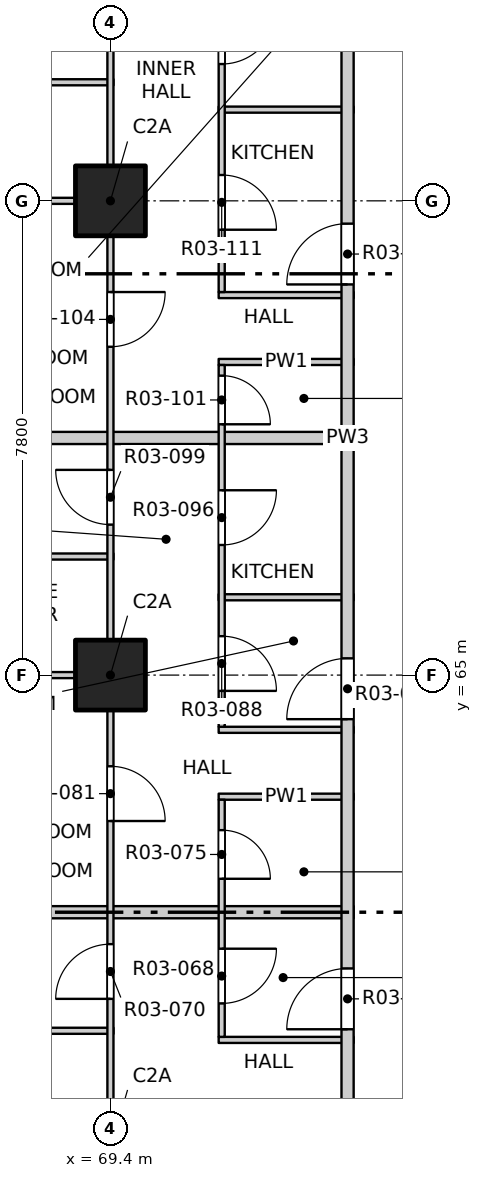
"""IFC4 building model, lengths in metres.
Left out: names, types, materials, properties, quantities, classifications, styles, units other than length and angle.
Written with IfcOpenShell. Run it as: python <this file> out.ifc"""

import sys

from ifc_helpers import new_model, si_unit, direction, frame, frame_2d, origin, origin_2d, place, context, subcontext, project, spatial, rectangle, extrude, element, fill, save


model = new_model("IFC4")
c1 = context("Model", 3, precision=1e-05, world=origin(), true_north=direction((0.0, 1.0)))
c2 = subcontext(c1, "Body", "Model", "MODEL_VIEW")
j1 = project(units=[si_unit("LENGTHUNIT", "METRE"), si_unit("PLANEANGLEUNIT", "RADIAN")], contexts=[c1])
p1 = place(None, origin())
s1 = spatial("IfcSite", under=j1, at=p1, CompositionType="ELEMENT")
p2 = place(p1, origin())
s2 = spatial("IfcBuilding", under=s1, at=p2, CompositionType="ELEMENT")
p3 = place(p2, frame((0.0, 0.0, 39.9)))
s3 = spatial("IfcBuildingStorey", under=s2, at=p3, CompositionType="ELEMENT", Elevation=39.9)
for number, where, z_axis, x_axis in (
    (1, (69.4, 65.0, -0.25), (0.0, 0.0, 1.0), (1.0, 0.0, 0.0)),
    (2, (69.4, 72.8, -0.25), (0.0, 0.0, 1.0), (1.0, 0.0, 0.0)),
):
    element("IfcColumn", number, at=place(p3, frame(where, z_axis=z_axis, x_axis=x_axis)), inside=s3, PredefinedType="COLUMN", context=c2, shape_type="SweptSolid", body=[
        extrude(rectangle(XDim=1.15, YDim=1.15, at=origin_2d()), origin(), (0.0, 0.0, 1.0), 3.4),
    ])
p4 = place(p3, frame((71.18, 59.0, 0.0), z_axis=(0.0, 0.0, 1.0), x_axis=(1.0, 0.0, 0.0)))
e3 = element("IfcWall", 3, at=p4, inside=s3, PredefinedType="PARTITIONING", context=c2, shape_type="SweptSolid", body=[
    extrude(rectangle(XDim=2.22, YDim=0.1, at=frame_2d((1.11, 0.0))), origin(), (0.0, 0.0, 1.0), 3.15),
])
p5 = place(p3, frame((65.75, 59.15, 0.0), z_axis=(0.0, 0.0, 1.0), x_axis=(1.0, 0.0, 0.0)))
e4 = element("IfcWall", 4, at=p5, inside=s3, PredefinedType="PARTITIONING", context=c2, shape_type="SweptSolid", body=[
    extrude(rectangle(XDim=3.7, YDim=0.1, at=frame_2d((1.85, 0.0))), origin(), (0.0, 0.0, 1.0), 3.15),
])
p6 = place(p3, frame((61.9, 61.1, 0.0), z_axis=(0.0, 0.0, 1.0), x_axis=(1.0, 0.0, 0.0)))
e5 = element("IfcWall", 5, at=p6, inside=s3, PredefinedType="PARTITIONING", context=c2, shape_type="SweptSolid", body=[
    extrude(rectangle(XDim=11.5, YDim=0.2, at=frame_2d((5.75, 0.0))), origin(), (0.0, 0.0, 1.0), 3.15),
])
for number, where, z_axis, x_axis in (
    (6, (71.18, 63.0, 0.0), (0.0, 0.0, 1.0), (1.0, 0.0, 0.0)),
    (7, (71.18, 64.1, 0.0), (0.0, 0.0, 1.0), (1.0, 0.0, 0.0)),
):
    element("IfcWall", number, at=place(p3, frame(where, z_axis=z_axis, x_axis=x_axis)), inside=s3, PredefinedType="PARTITIONING", context=c2, shape_type="SweptSolid", body=[
        extrude(rectangle(XDim=2.22, YDim=0.1, at=frame_2d((1.11, 0.0))), origin(), (0.0, 0.0, 1.0), 3.15),
    ])
p7 = place(p3, frame((61.9, 65.0, 0.0), z_axis=(0.0, 0.0, 1.0), x_axis=(1.0, 0.0, 0.0)))
e8 = element("IfcWall", 8, at=p7, inside=s3, PredefinedType="PARTITIONING", context=c2, shape_type="SweptSolid", body=[
    extrude(rectangle(XDim=7.55, YDim=0.1, at=frame_2d((3.775, 0.0))), origin(), (0.0, 0.0, 1.0), 2.55),
])
p8 = place(p3, frame((71.18, 66.28, 0.0), z_axis=(0.0, 0.0, 1.0), x_axis=(1.0, 0.0, 0.0)))
e9 = element("IfcWall", 9, at=p8, inside=s3, PredefinedType="PARTITIONING", context=c2, shape_type="SweptSolid", body=[
    extrude(rectangle(XDim=2.22, YDim=0.1, at=frame_2d((1.11, 0.0))), origin(), (0.0, 0.0, 1.0), 3.15),
])
p9 = place(p3, frame((65.9, 66.95, 0.0), z_axis=(0.0, 0.0, 1.0), x_axis=(1.0, 0.0, 0.0)))
e10 = element("IfcWall", 10, at=p9, inside=s3, PredefinedType="PARTITIONING", context=c2, shape_type="SweptSolid", body=[
    extrude(rectangle(XDim=3.55, YDim=0.1, at=frame_2d((1.775, 0.0))), origin(), (0.0, 0.0, 1.0), 3.15),
])
p10 = place(p3, frame((61.9, 68.9, 0.0), z_axis=(0.0, 0.0, 1.0), x_axis=(1.0, 0.0, 0.0)))
e11 = element("IfcWall", 11, at=p10, inside=s3, PredefinedType="PARTITIONING", context=c2, shape_type="SweptSolid", body=[
    extrude(rectangle(XDim=11.5, YDim=0.2, at=frame_2d((5.75, 0.0))), origin(), (0.0, 0.0, 1.0), 3.15),
])
for number, where, z_axis, x_axis in (
    (12, (71.18, 70.15, 0.0), (0.0, 0.0, 1.0), (1.0, 0.0, 0.0)),
    (13, (71.18, 71.25, 0.0), (0.0, 0.0, 1.0), (1.0, 0.0, 0.0)),
):
    element("IfcWall", number, at=place(p3, frame(where, z_axis=z_axis, x_axis=x_axis)), inside=s3, PredefinedType="PARTITIONING", context=c2, shape_type="SweptSolid", body=[
        extrude(rectangle(XDim=2.22, YDim=0.1, at=frame_2d((1.11, 0.0))), origin(), (0.0, 0.0, 1.0), 3.15),
    ])
p11 = place(p3, frame((61.9, 72.8, 0.0), z_axis=(0.0, 0.0, 1.0), x_axis=(1.0, 0.0, 0.0)))
e14 = element("IfcWall", 14, at=p11, inside=s3, PredefinedType="PARTITIONING", context=c2, shape_type="SweptSolid", body=[
    extrude(rectangle(XDim=7.55, YDim=0.1, at=frame_2d((3.775, 0.0))), origin(), (0.0, 0.0, 1.0), 2.55),
])
p12 = place(p3, frame((71.18, 74.3, 0.0), z_axis=(0.0, 0.0, 1.0), x_axis=(1.0, 0.0, 0.0)))
e15 = element("IfcWall", 15, at=p12, inside=s3, PredefinedType="PARTITIONING", context=c2, shape_type="SweptSolid", body=[
    extrude(rectangle(XDim=2.22, YDim=0.1, at=frame_2d((1.11, 0.0))), origin(), (0.0, 0.0, 1.0), 3.15),
])
p13 = place(p3, frame((65.75, 74.75, 0.0), z_axis=(0.0, 0.0, 1.0), x_axis=(1.0, 0.0, 0.0)))
e16 = element("IfcWall", 16, at=p13, inside=s3, PredefinedType="PARTITIONING", context=c2, shape_type="SweptSolid", body=[
    extrude(rectangle(XDim=3.7, YDim=0.1, at=frame_2d((1.85, 0.0))), origin(), (0.0, 0.0, 1.0), 3.15),
])
p14 = place(p3, frame((69.4, 41.9, 0.0), z_axis=(0.0, 0.0, 1.0), x_axis=(0.0, 1.0, 0.0)))
e17 = element("IfcWall", 17, at=p14, inside=s3, PredefinedType="PARTITIONING", context=c2, shape_type="SweptSolid", body=[
    extrude(rectangle(XDim=46.2, YDim=0.1, at=frame_2d((23.1, 0.0))), origin(), (0.0, 0.0, 1.0), 3.15),
])
p15 = place(p14, frame((1.2, 0.0, 0.0)))
e18 = element("IfcOpeningElement", 18, at=p15, cuts=e17, PredefinedType="OPENING", context=c2, shape_type="SweptSolid", body=[
    extrude(rectangle(XDim=0.9, YDim=2.1, at=frame_2d((0.45, 1.05))), frame((0.0, 0.06, 0.0), z_axis=(0.0, -1.0, 0.0), x_axis=(1.0, 0.0, 0.0)), (0.0, 0.0, 1.0), 0.12),
])
p16 = place(p14, frame((5.9, 0.0, 0.0)))
e19 = element("IfcOpeningElement", 19, at=p16, cuts=e17, PredefinedType="OPENING", context=c2, shape_type="SweptSolid", body=[
    extrude(rectangle(XDim=0.9, YDim=2.1, at=frame_2d((0.45, 1.05))), frame((0.0, 0.06, 0.0), z_axis=(0.0, -1.0, 0.0), x_axis=(1.0, 0.0, 0.0)), (0.0, 0.0, 1.0), 0.12),
])
p17 = place(p14, frame((9.0, 0.0, 0.0)))
e20 = element("IfcOpeningElement", 20, at=p17, cuts=e17, PredefinedType="OPENING", context=c2, shape_type="SweptSolid", body=[
    extrude(rectangle(XDim=0.9, YDim=2.1, at=frame_2d((0.45, 1.05))), frame((0.0, 0.06, 0.0), z_axis=(0.0, -1.0, 0.0), x_axis=(1.0, 0.0, 0.0)), (0.0, 0.0, 1.0), 0.12),
])
p18 = place(p14, frame((13.725, 0.0, 0.0)))
e21 = element("IfcOpeningElement", 21, at=p18, cuts=e17, PredefinedType="OPENING", context=c2, shape_type="SweptSolid", body=[
    extrude(rectangle(XDim=0.9, YDim=2.1, at=frame_2d((0.45, 1.05))), frame((0.0, 0.06, 0.0), z_axis=(0.0, -1.0, 0.0), x_axis=(1.0, 0.0, 0.0)), (0.0, 0.0, 1.0), 0.12),
])
p19 = place(p14, frame((17.775, 0.0, 0.0)))
e22 = element("IfcOpeningElement", 22, at=p19, cuts=e17, PredefinedType="OPENING", context=c2, shape_type="SweptSolid", body=[
    extrude(rectangle(XDim=0.9, YDim=2.1, at=frame_2d((0.45, 1.05))), frame((0.0, 0.06, 0.0), z_axis=(0.0, -1.0, 0.0), x_axis=(1.0, 0.0, 0.0)), (0.0, 0.0, 1.0), 0.12),
])
p20 = place(p14, frame((20.7, 0.0, 0.0)))
e23 = element("IfcOpeningElement", 23, at=p20, cuts=e17, PredefinedType="OPENING", context=c2, shape_type="SweptSolid", body=[
    extrude(rectangle(XDim=0.9, YDim=2.1, at=frame_2d((0.45, 1.05))), frame((0.0, 0.06, 0.0), z_axis=(0.0, -1.0, 0.0), x_axis=(1.0, 0.0, 0.0)), (0.0, 0.0, 1.0), 0.12),
])
p21 = place(p14, frame((25.575, 0.0, 0.0)))
e24 = element("IfcOpeningElement", 24, at=p21, cuts=e17, PredefinedType="OPENING", context=c2, shape_type="SweptSolid", body=[
    extrude(rectangle(XDim=0.9, YDim=2.1, at=frame_2d((0.45, 1.05))), frame((0.0, 0.06, 0.0), z_axis=(0.0, -1.0, 0.0), x_axis=(1.0, 0.0, 0.0)), (0.0, 0.0, 1.0), 0.12),
])
p22 = place(p14, frame((28.5, 0.0, 0.0)))
e25 = element("IfcOpeningElement", 25, at=p22, cuts=e17, PredefinedType="OPENING", context=c2, shape_type="SweptSolid", body=[
    extrude(rectangle(XDim=0.9, YDim=2.1, at=frame_2d((0.45, 1.05))), frame((0.0, 0.06, 0.0), z_axis=(0.0, -1.0, 0.0), x_axis=(1.0, 0.0, 0.0)), (0.0, 0.0, 1.0), 0.12),
])
p23 = place(p14, frame((33.375, 0.0, 0.0)))
e26 = element("IfcOpeningElement", 26, at=p23, cuts=e17, PredefinedType="OPENING", context=c2, shape_type="SweptSolid", body=[
    extrude(rectangle(XDim=0.9, YDim=2.1, at=frame_2d((0.45, 1.05))), frame((0.0, 0.06, 0.0), z_axis=(0.0, -1.0, 0.0), x_axis=(1.0, 0.0, 0.0)), (0.0, 0.0, 1.0), 0.12),
])
p24 = place(p14, frame((36.3, 0.0, 0.0)))
e27 = element("IfcOpeningElement", 27, at=p24, cuts=e17, PredefinedType="OPENING", context=c2, shape_type="SweptSolid", body=[
    extrude(rectangle(XDim=0.9, YDim=2.1, at=frame_2d((0.45, 1.05))), frame((0.0, 0.06, 0.0), z_axis=(0.0, -1.0, 0.0), x_axis=(1.0, 0.0, 0.0)), (0.0, 0.0, 1.0), 0.12),
])
p25 = place(p14, frame((40.2, 0.0, 0.0)))
e28 = element("IfcOpeningElement", 28, at=p25, cuts=e17, PredefinedType="OPENING", context=c2, shape_type="SweptSolid", body=[
    extrude(rectangle(XDim=0.9, YDim=2.1, at=frame_2d((0.45, 1.05))), frame((0.0, 0.06, 0.0), z_axis=(0.0, -1.0, 0.0), x_axis=(1.0, 0.0, 0.0)), (0.0, 0.0, 1.0), 0.12),
])
p26 = place(p14, frame((44.1, 0.0, 0.0)))
e29 = element("IfcOpeningElement", 29, at=p26, cuts=e17, PredefinedType="OPENING", context=c2, shape_type="SweptSolid", body=[
    extrude(rectangle(XDim=0.9, YDim=2.1, at=frame_2d((0.45, 1.05))), frame((0.0, 0.06, 0.0), z_axis=(0.0, -1.0, 0.0), x_axis=(1.0, 0.0, 0.0)), (0.0, 0.0, 1.0), 0.12),
])
p27 = place(p3, frame((71.23, 59.05, 0.0), z_axis=(0.0, 0.0, 1.0), x_axis=(0.0, 1.0, 0.0)))
e30 = element("IfcWall", 30, at=p27, inside=s3, PredefinedType="PARTITIONING", context=c2, shape_type="SweptSolid", body=[
    extrude(rectangle(XDim=3.9, YDim=0.1, at=frame_2d((1.95, 0.0))), origin(), (0.0, 0.0, 1.0), 3.15),
])
p28 = place(p27, frame((0.55, 0.0, 0.0)))
e31 = element("IfcOpeningElement", 31, at=p28, cuts=e30, PredefinedType="OPENING", context=c2, shape_type="SweptSolid", body=[
    extrude(rectangle(XDim=0.9, YDim=2.1, at=frame_2d((0.45, 1.05))), frame((0.0, 0.06, 0.0), z_axis=(0.0, -1.0, 0.0), x_axis=(1.0, 0.0, 0.0)), (0.0, 0.0, 1.0), 0.12),
])
p29 = place(p27, frame((2.6, 0.0, 0.0)))
e32 = element("IfcOpeningElement", 32, at=p29, cuts=e30, PredefinedType="OPENING", context=c2, shape_type="SweptSolid", body=[
    extrude(rectangle(XDim=0.8, YDim=2.1, at=frame_2d((0.4, 1.05))), frame((0.0, 0.06, 0.0), z_axis=(0.0, -1.0, 0.0), x_axis=(1.0, 0.0, 0.0)), (0.0, 0.0, 1.0), 0.12),
])
p30 = place(p3, frame((71.23, 64.15, 0.0), z_axis=(0.0, 0.0, 1.0), x_axis=(0.0, 1.0, 0.0)))
e33 = element("IfcWall", 33, at=p30, inside=s3, PredefinedType="PARTITIONING", context=c2, shape_type="SweptSolid", body=[
    extrude(rectangle(XDim=5.95, YDim=0.1, at=frame_2d((2.975, 0.0))), origin(), (0.0, 0.0, 1.0), 3.15),
])
p31 = place(p30, frame((0.59, 0.0, 0.0)))
e34 = element("IfcOpeningElement", 34, at=p31, cuts=e33, PredefinedType="OPENING", context=c2, shape_type="SweptSolid", body=[
    extrude(rectangle(XDim=0.9, YDim=2.1, at=frame_2d((0.45, 1.05))), frame((0.0, 0.06, 0.0), z_axis=(0.0, -1.0, 0.0), x_axis=(1.0, 0.0, 0.0)), (0.0, 0.0, 1.0), 0.12),
])
p32 = place(p30, frame((2.99, 0.0, 0.0)))
e35 = element("IfcOpeningElement", 35, at=p32, cuts=e33, PredefinedType="OPENING", context=c2, shape_type="SweptSolid", body=[
    extrude(rectangle(XDim=0.9, YDim=2.1, at=frame_2d((0.45, 1.05))), frame((0.0, 0.06, 0.0), z_axis=(0.0, -1.0, 0.0), x_axis=(1.0, 0.0, 0.0)), (0.0, 0.0, 1.0), 0.12),
])
p33 = place(p30, frame((4.975, 0.0, 0.0)))
e36 = element("IfcOpeningElement", 36, at=p33, cuts=e33, PredefinedType="OPENING", context=c2, shape_type="SweptSolid", body=[
    extrude(rectangle(XDim=0.8, YDim=2.1, at=frame_2d((0.4, 1.05))), frame((0.0, 0.06, 0.0), z_axis=(0.0, -1.0, 0.0), x_axis=(1.0, 0.0, 0.0)), (0.0, 0.0, 1.0), 0.12),
])
p34 = place(p3, frame((71.23, 71.3, 0.0), z_axis=(0.0, 0.0, 1.0), x_axis=(0.0, 1.0, 0.0)))
e37 = element("IfcWall", 37, at=p34, inside=s3, PredefinedType="PARTITIONING", context=c2, shape_type="SweptSolid", body=[
    extrude(rectangle(XDim=10.95, YDim=0.1, at=frame_2d((5.475, 0.0))), origin(), (0.0, 0.0, 1.0), 3.15),
])
p35 = place(p34, frame((1.025, 0.0, 0.0)))
e38 = element("IfcOpeningElement", 38, at=p35, cuts=e37, PredefinedType="OPENING", context=c2, shape_type="SweptSolid", body=[
    extrude(rectangle(XDim=0.9, YDim=2.1, at=frame_2d((0.45, 1.05))), frame((0.0, 0.06, 0.0), z_axis=(0.0, -1.0, 0.0), x_axis=(1.0, 0.0, 0.0)), (0.0, 0.0, 1.0), 0.12),
])
p36 = place(p34, frame((3.75, 0.0, 0.0)))
e39 = element("IfcOpeningElement", 39, at=p36, cuts=e37, PredefinedType="OPENING", context=c2, shape_type="SweptSolid", body=[
    extrude(rectangle(XDim=0.9, YDim=2.1, at=frame_2d((0.45, 1.05))), frame((0.0, 0.06, 0.0), z_axis=(0.0, -1.0, 0.0), x_axis=(1.0, 0.0, 0.0)), (0.0, 0.0, 1.0), 0.12),
])
p37 = place(p34, frame((6.15, 0.0, 0.0)))
e40 = element("IfcOpeningElement", 40, at=p37, cuts=e37, PredefinedType="OPENING", context=c2, shape_type="SweptSolid", body=[
    extrude(rectangle(XDim=0.9, YDim=2.1, at=frame_2d((0.45, 1.05))), frame((0.0, 0.06, 0.0), z_axis=(0.0, -1.0, 0.0), x_axis=(1.0, 0.0, 0.0)), (0.0, 0.0, 1.0), 0.12),
])
p38 = place(p34, frame((8.95, 0.0, 0.0)))
e41 = element("IfcOpeningElement", 41, at=p38, cuts=e37, PredefinedType="OPENING", context=c2, shape_type="SweptSolid", body=[
    extrude(rectangle(XDim=0.9, YDim=2.1, at=frame_2d((0.45, 1.05))), frame((0.0, 0.06, 0.0), z_axis=(0.0, -1.0, 0.0), x_axis=(1.0, 0.0, 0.0)), (0.0, 0.0, 1.0), 0.12),
])
p39 = place(p3, frame((73.3, 53.4, 0.0), z_axis=(0.0, 0.0, 1.0), x_axis=(0.0, 1.0, 0.0)))
e42 = element("IfcWall", 42, at=p39, inside=s3, PredefinedType="PARTITIONING", context=c2, shape_type="SweptSolid", body=[
    extrude(rectangle(XDim=31.0, YDim=0.2, at=frame_2d((15.5, 0.0))), origin(), (0.0, 0.0, 1.0), 3.15),
])
p40 = place(p39, frame((5.775, 0.0, 0.0)))
e43 = element("IfcOpeningElement", 43, at=p40, cuts=e42, PredefinedType="OPENING", context=c2, shape_type="SweptSolid", body=[
    extrude(rectangle(XDim=1.0, YDim=2.1, at=frame_2d((0.5, 1.05))), frame((0.0, 0.11, 0.0), z_axis=(0.0, -1.0, 0.0), x_axis=(1.0, 0.0, 0.0)), (0.0, 0.0, 1.0), 0.22),
])
p41 = place(p39, frame((10.875, 0.0, 0.0)))
e44 = element("IfcOpeningElement", 44, at=p41, cuts=e42, PredefinedType="OPENING", context=c2, shape_type="SweptSolid", body=[
    extrude(rectangle(XDim=1.0, YDim=2.1, at=frame_2d((0.5, 1.05))), frame((0.0, 0.11, 0.0), z_axis=(0.0, -1.0, 0.0), x_axis=(1.0, 0.0, 0.0)), (0.0, 0.0, 1.0), 0.22),
])
p42 = place(p39, frame((18.025, 0.0, 0.0)))
e45 = element("IfcOpeningElement", 45, at=p42, cuts=e42, PredefinedType="OPENING", context=c2, shape_type="SweptSolid", body=[
    extrude(rectangle(XDim=1.0, YDim=2.1, at=frame_2d((0.5, 1.05))), frame((0.0, 0.11, 0.0), z_axis=(0.0, -1.0, 0.0), x_axis=(1.0, 0.0, 0.0)), (0.0, 0.0, 1.0), 0.22),
])
p43 = place(p39, frame((27.725, 0.0, 0.0)))
e46 = element("IfcOpeningElement", 46, at=p43, cuts=e42, PredefinedType="OPENING", context=c2, shape_type="SweptSolid", body=[
    extrude(rectangle(XDim=1.0, YDim=2.1, at=frame_2d((0.5, 1.05))), frame((0.0, 0.11, 0.0), z_axis=(0.0, -1.0, 0.0), x_axis=(1.0, 0.0, 0.0)), (0.0, 0.0, 1.0), 0.22),
])
p44 = place(p40, origin())
e47 = element("IfcDoor", 47, at=p44, inside=s3, OperationType="SINGLE_SWING_RIGHT", PredefinedType="DOOR", context=c2, shape_type="SweptSolid", body=[
    extrude(rectangle(XDim=1.0, YDim=2.1, at=frame_2d((0.5, 1.05))), frame((0.0, 0.025, 0.0), z_axis=(0.0, -1.0, 0.0), x_axis=(1.0, 0.0, 0.0)), (0.0, 0.0, 1.0), 0.05),
])
fill(e43, e47)
p45 = place(p28, origin())
e48 = element("IfcDoor", 48, at=p45, inside=s3, OperationType="SINGLE_SWING_LEFT", PredefinedType="DOOR", context=c2, shape_type="SweptSolid", body=[
    extrude(rectangle(XDim=0.9, YDim=2.1, at=frame_2d((0.45, 1.05))), frame((0.0, 0.025, 0.0), z_axis=(0.0, -1.0, 0.0), x_axis=(1.0, 0.0, 0.0)), (0.0, 0.0, 1.0), 0.05),
])
fill(e31, e48)
p46 = place(p19, origin())
e49 = element("IfcDoor", 49, at=p46, inside=s3, OperationType="SINGLE_SWING_LEFT", PredefinedType="DOOR", context=c2, shape_type="SweptSolid", body=[
    extrude(rectangle(XDim=0.9, YDim=2.1, at=frame_2d((0.45, 1.05))), frame((0.0, 0.025, 0.0), z_axis=(0.0, -1.0, 0.0), x_axis=(1.0, 0.0, 0.0)), (0.0, 0.0, 1.0), 0.05),
])
fill(e22, e49)
p47 = place(p29, origin())
e50 = element("IfcDoor", 50, at=p47, inside=s3, OperationType="SINGLE_SWING_RIGHT", PredefinedType="DOOR", context=c2, shape_type="SweptSolid", body=[
    extrude(rectangle(XDim=0.8, YDim=2.1, at=frame_2d((0.4, 1.05))), frame((0.0, 0.025, 0.0), z_axis=(0.0, -1.0, 0.0), x_axis=(1.0, 0.0, 0.0)), (0.0, 0.0, 1.0), 0.05),
])
fill(e32, e50)
p48 = place(p20, origin())
e51 = element("IfcDoor", 51, at=p48, inside=s3, OperationType="SINGLE_SWING_RIGHT", PredefinedType="DOOR", context=c2, shape_type="SweptSolid", body=[
    extrude(rectangle(XDim=0.9, YDim=2.1, at=frame_2d((0.45, 1.05))), frame((0.0, 0.025, 0.0), z_axis=(0.0, -1.0, 0.0), x_axis=(1.0, 0.0, 0.0)), (0.0, 0.0, 1.0), 0.05),
])
fill(e23, e51)
p49 = place(p41, origin())
e52 = element("IfcDoor", 52, at=p49, inside=s3, OperationType="SINGLE_SWING_RIGHT", PredefinedType="DOOR", context=c2, shape_type="SweptSolid", body=[
    extrude(rectangle(XDim=1.0, YDim=2.1, at=frame_2d((0.5, 1.05))), frame((0.0, 0.025, 0.0), z_axis=(0.0, -1.0, 0.0), x_axis=(1.0, 0.0, 0.0)), (0.0, 0.0, 1.0), 0.05),
])
fill(e44, e52)
p50 = place(p31, origin())
e53 = element("IfcDoor", 53, at=p50, inside=s3, OperationType="SINGLE_SWING_RIGHT", PredefinedType="DOOR", context=c2, shape_type="SweptSolid", body=[
    extrude(rectangle(XDim=0.9, YDim=2.1, at=frame_2d((0.45, 1.05))), frame((0.0, 0.025, 0.0), z_axis=(0.0, -1.0, 0.0), x_axis=(1.0, 0.0, 0.0)), (0.0, 0.0, 1.0), 0.05),
])
fill(e34, e53)
p51 = place(p32, origin())
e54 = element("IfcDoor", 54, at=p51, inside=s3, OperationType="SINGLE_SWING_LEFT", PredefinedType="DOOR", context=c2, shape_type="SweptSolid", body=[
    extrude(rectangle(XDim=0.9, YDim=2.1, at=frame_2d((0.45, 1.05))), frame((0.0, 0.025, 0.0), z_axis=(0.0, -1.0, 0.0), x_axis=(1.0, 0.0, 0.0)), (0.0, 0.0, 1.0), 0.05),
])
fill(e35, e54)
p52 = place(p21, origin())
e55 = element("IfcDoor", 55, at=p52, inside=s3, OperationType="SINGLE_SWING_RIGHT", PredefinedType="DOOR", context=c2, shape_type="SweptSolid", body=[
    extrude(rectangle(XDim=0.9, YDim=2.1, at=frame_2d((0.45, 1.05))), frame((0.0, 0.025, 0.0), z_axis=(0.0, -1.0, 0.0), x_axis=(1.0, 0.0, 0.0)), (0.0, 0.0, 1.0), 0.05),
])
fill(e24, e55)
p53 = place(p33, origin())
e56 = element("IfcDoor", 56, at=p53, inside=s3, OperationType="SINGLE_SWING_RIGHT", PredefinedType="DOOR", context=c2, shape_type="SweptSolid", body=[
    extrude(rectangle(XDim=0.8, YDim=2.1, at=frame_2d((0.4, 1.05))), frame((0.0, 0.025, 0.0), z_axis=(0.0, -1.0, 0.0), x_axis=(1.0, 0.0, 0.0)), (0.0, 0.0, 1.0), 0.05),
])
fill(e36, e56)
p54 = place(p22, origin())
e57 = element("IfcDoor", 57, at=p54, inside=s3, OperationType="SINGLE_SWING_LEFT", PredefinedType="DOOR", context=c2, shape_type="SweptSolid", body=[
    extrude(rectangle(XDim=0.9, YDim=2.1, at=frame_2d((0.45, 1.05))), frame((0.0, 0.025, 0.0), z_axis=(0.0, -1.0, 0.0), x_axis=(1.0, 0.0, 0.0)), (0.0, 0.0, 1.0), 0.05),
])
fill(e25, e57)
p55 = place(p42, origin())
e58 = element("IfcDoor", 58, at=p55, inside=s3, OperationType="SINGLE_SWING_RIGHT", PredefinedType="DOOR", context=c2, shape_type="SweptSolid", body=[
    extrude(rectangle(XDim=1.0, YDim=2.1, at=frame_2d((0.5, 1.05))), frame((0.0, 0.025, 0.0), z_axis=(0.0, -1.0, 0.0), x_axis=(1.0, 0.0, 0.0)), (0.0, 0.0, 1.0), 0.05),
])
fill(e45, e58)
p56 = place(p35, origin())
e59 = element("IfcDoor", 59, at=p56, inside=s3, OperationType="SINGLE_SWING_RIGHT", PredefinedType="DOOR", context=c2, shape_type="SweptSolid", body=[
    extrude(rectangle(XDim=0.9, YDim=2.1, at=frame_2d((0.45, 1.05))), frame((0.0, 0.025, 0.0), z_axis=(0.0, -1.0, 0.0), x_axis=(1.0, 0.0, 0.0)), (0.0, 0.0, 1.0), 0.05),
])
fill(e38, e59)
p57 = place(p36, origin())
e60 = element("IfcDoor", 60, at=p57, inside=s3, OperationType="SINGLE_SWING_LEFT", PredefinedType="DOOR", context=c2, shape_type="SweptSolid", body=[
    extrude(rectangle(XDim=0.9, YDim=2.1, at=frame_2d((0.45, 1.05))), frame((0.0, 0.025, 0.0), z_axis=(0.0, -1.0, 0.0), x_axis=(1.0, 0.0, 0.0)), (0.0, 0.0, 1.0), 0.05),
])
fill(e39, e60)
save(model, sys.argv[1])
